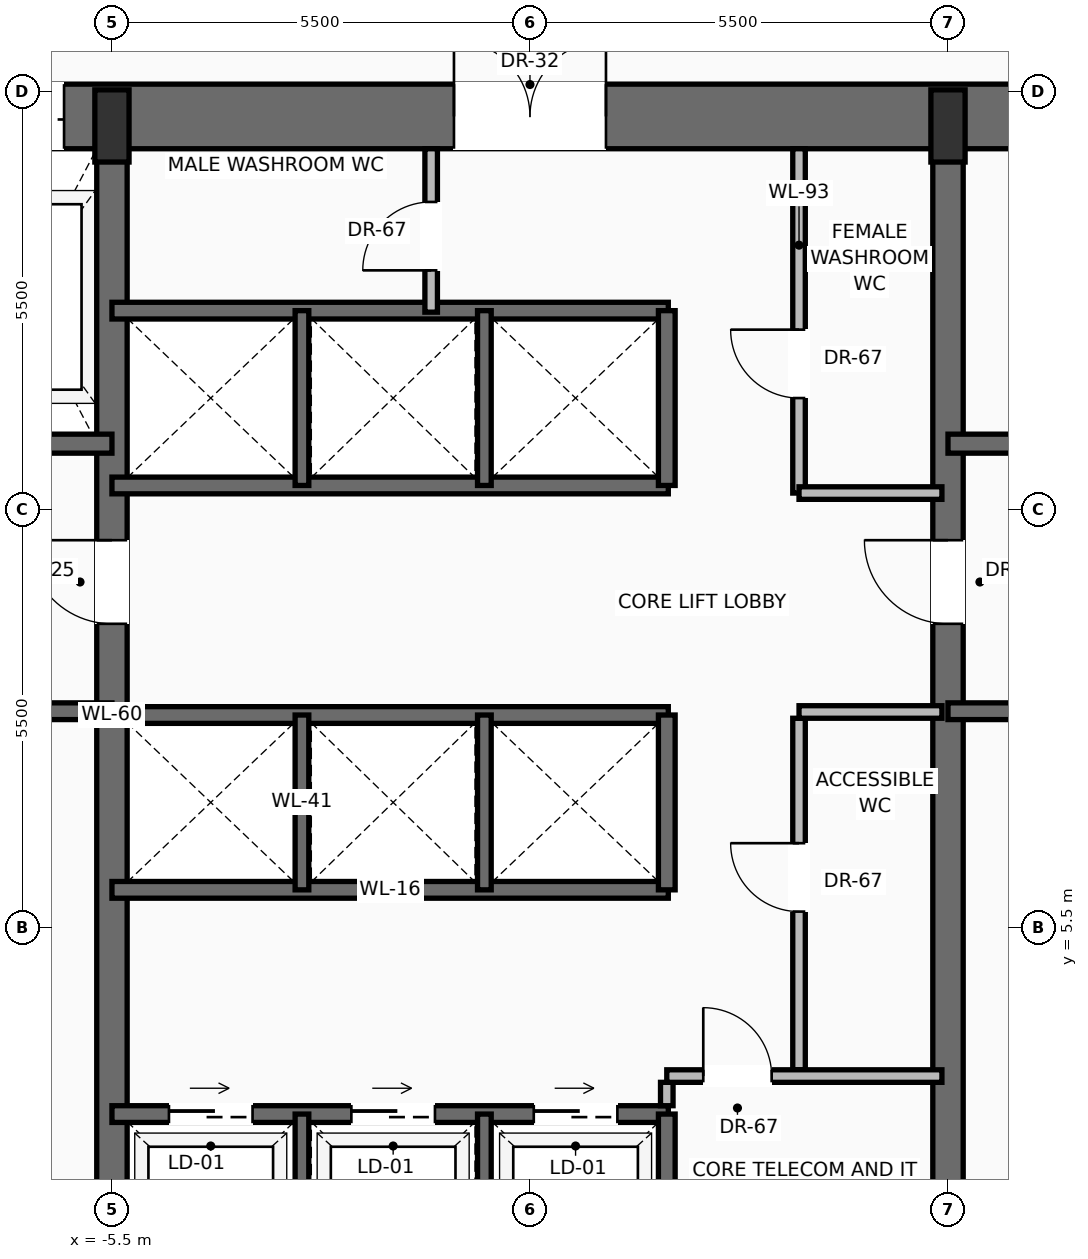
"""IFC4 building model, lengths in metres.
Left out: names, types, materials, properties, quantities, classifications, styles, units other than length and angle.
Written with IfcOpenShell. Run it as: python <this file> out.ifc"""

import sys

from ifc_helpers import new_model, si_unit, direction, frame, frame_2d, origin, origin_2d, place, context, subcontext, project, spatial, rectangle, extrude, source, transform, mapped, element, fill, save


model = new_model("IFC4")
c1 = context("Model", 3, precision=1e-05, world=origin(), true_north=direction((0.0, 1.0)))
c2 = subcontext(c1, "Body", "Model", "MODEL_VIEW")
j1 = project(units=[si_unit("LENGTHUNIT", "METRE"), si_unit("PLANEANGLEUNIT", "RADIAN")], contexts=[c1])
p1 = place(None, origin())
s1 = spatial("IfcSite", under=j1, at=p1, CompositionType="ELEMENT")
p2 = place(p1, origin())
s2 = spatial("IfcBuilding", under=s1, at=p2, CompositionType="ELEMENT")
p3 = place(p2, frame((0.0, 0.0, 31.2)))
s3 = spatial("IfcBuildingStorey", under=s2, at=p3, CompositionType="ELEMENT", Elevation=31.2)
p4 = place(p3, frame((-11.0, 16.175, 0.0), z_axis=(0.0, 0.0, 1.0), x_axis=(1.0, 0.0, 0.0)))
e1 = element("IfcWall", 1, at=p4, inside=s3, PredefinedType="SHEAR", context=c2, shape_type="SweptSolid", body=[
    extrude(rectangle(XDim=22.0, YDim=0.85, at=frame_2d((11.0, 0.0))), origin(), (0.0, 0.0, 1.0), 3.45),
])
p5 = place(p4, frame((3.57, 0.0, 0.0)))
e2 = element("IfcOpeningElement", 2, at=p5, cuts=e1, PredefinedType="OPENING", context=c2, shape_type="SweptSolid", body=[
    extrude(rectangle(XDim=1.3, YDim=2.3, at=frame_2d((0.65, 1.15))), frame((0.0, 0.435, 0.0), z_axis=(0.0, -1.0, 0.0), x_axis=(1.0, 0.0, 0.0)), (0.0, 0.0, 1.0), 0.87),
])
p6 = place(p4, frame((10.0, 0.0, 0.0)))
e3 = element("IfcOpeningElement", 3, at=p6, cuts=e1, PredefinedType="OPENING", context=c2, shape_type="SweptSolid", body=[
    extrude(rectangle(XDim=2.0, YDim=2.4, at=frame_2d((1.0, 1.2))), frame((0.0, 0.435, 0.0), z_axis=(0.0, -1.0, 0.0), x_axis=(1.0, 0.0, 0.0)), (0.0, 0.0, 1.0), 0.87),
])
p7 = place(p3, frame((-5.5, 0.425, 0.0), z_axis=(0.0, 0.0, 1.0), x_axis=(0.0, 1.0, 0.0)))
e4 = element("IfcWall", 4, at=p7, inside=s3, PredefinedType="SHEAR", context=c2, shape_type="SweptSolid", body=[
    extrude(rectangle(XDim=15.75, YDim=0.4, at=frame_2d((7.875, 0.0))), origin(), (0.0, 0.0, 1.0), 3.45),
])
p8 = place(p7, frame((9.075, 0.0, 0.0)))
e5 = element("IfcOpeningElement", 5, at=p8, cuts=e4, PredefinedType="OPENING", context=c2, shape_type="SweptSolid", body=[
    extrude(rectangle(XDim=1.1, YDim=2.2, at=frame_2d((0.55, 1.1))), frame((0.0, 0.21, 0.0), z_axis=(0.0, -1.0, 0.0), x_axis=(1.0, 0.0, 0.0)), (0.0, 0.0, 1.0), 0.42),
])
p9 = place(p3, frame((5.5, 0.425, 0.0), z_axis=(0.0, 0.0, 1.0), x_axis=(0.0, 1.0, 0.0)))
e6 = element("IfcWall", 6, at=p9, inside=s3, PredefinedType="SHEAR", context=c2, shape_type="SweptSolid", body=[
    extrude(rectangle(XDim=15.75, YDim=0.4, at=frame_2d((7.875, 0.0))), origin(), (0.0, 0.0, 1.0), 3.45),
])
p10 = place(p9, frame((9.075, 0.0, 0.0)))
e7 = element("IfcOpeningElement", 7, at=p10, cuts=e6, PredefinedType="OPENING", context=c2, shape_type="SweptSolid", body=[
    extrude(rectangle(XDim=1.1, YDim=2.2, at=frame_2d((0.55, 1.1))), frame((0.0, 0.21, 0.0), z_axis=(0.0, -1.0, 0.0), x_axis=(1.0, 0.0, 0.0)), (0.0, 0.0, 1.0), 0.42),
])
m1 = source(origin(), c2, "Body", "SweptSolid", [
    extrude(rectangle(XDim=0.45, YDim=0.95, at=origin_2d()), origin(), (0.0, 0.0, 1.0), 3.7),
])
for number, where, z_axis, x_axis in (
    (8, (-5.5, 16.05, 0.0), (0.0, 0.0, 1.0), (1.0, 0.0, 0.0)),
    (9, (5.5, 16.05, 0.0), (0.0, 0.0, 1.0), (1.0, 0.0, 0.0)),
):
    element("IfcColumn", number, at=place(p3, frame(where, z_axis=z_axis, x_axis=x_axis)), inside=s3, PredefinedType="PILASTER", context=c2, shape_type="MappedRepresentation", body=[
        mapped(m1, transform((0.0, 0.0, 0.0), scale=1.0)),
    ])
p11 = place(p3, frame((-5.5, 8.35, 0.0), z_axis=(0.0, 0.0, 1.0), x_axis=(-1.0, 0.0, 0.0)))
e10 = element("IfcWall", 10, at=p11, inside=s3, PredefinedType="SOLIDWALL", context=c2, shape_type="SweptSolid", body=[
    extrude(rectangle(XDim=4.65, YDim=0.22, at=frame_2d((2.325, 0.0))), origin(), (0.0, 0.0, 1.0), 3.45),
])
p12 = place(p11, frame((2.5, 0.0, 0.0)))
e11 = element("IfcOpeningElement", 11, at=p12, cuts=e10, PredefinedType="OPENING", context=c2, shape_type="SweptSolid", body=[
    extrude(rectangle(XDim=1.15, YDim=2.2, at=frame_2d((0.575, 1.1))), frame((0.0, 0.12, 0.0), z_axis=(0.0, -1.0, 0.0), x_axis=(1.0, 0.0, 0.0)), (0.0, 0.0, 1.0), 0.24),
])
p13 = place(p3, frame((-5.5, 11.87, 0.0), z_axis=(0.0, 0.0, 1.0), x_axis=(-1.0, 0.0, 0.0)))
e12 = element("IfcWall", 12, at=p13, inside=s3, PredefinedType="SOLIDWALL", context=c2, shape_type="SweptSolid", body=[
    extrude(rectangle(XDim=4.65, YDim=0.25, at=frame_2d((2.325, 0.0))), origin(), (0.0, 0.0, 1.0), 3.45),
])
p14 = place(p13, frame((2.95, 0.0, 0.0)))
e13 = element("IfcOpeningElement", 13, at=p14, cuts=e12, PredefinedType="OPENING", context=c2, shape_type="SweptSolid", body=[
    extrude(rectangle(XDim=1.2, YDim=2.25, at=frame_2d((0.6, 1.125))), frame((0.0, 0.135, 0.0), z_axis=(0.0, -1.0, 0.0), x_axis=(1.0, 0.0, 0.0)), (0.0, 0.0, 1.0), 0.27),
])
p15 = place(p3, frame((10.15, 8.35, 0.0), z_axis=(0.0, 0.0, 1.0), x_axis=(-1.0, 0.0, 0.0)))
e14 = element("IfcWall", 14, at=p15, inside=s3, PredefinedType="SOLIDWALL", context=c2, shape_type="SweptSolid", body=[
    extrude(rectangle(XDim=4.65, YDim=0.22, at=frame_2d((2.325, 0.0))), origin(), (0.0, 0.0, 1.0), 3.45),
])
p16 = place(p15, frame((1.0, 0.0, 0.0)))
e15 = element("IfcOpeningElement", 15, at=p16, cuts=e14, PredefinedType="OPENING", context=c2, shape_type="SweptSolid", body=[
    extrude(rectangle(XDim=1.15, YDim=2.2, at=frame_2d((0.575, 1.1))), frame((0.0, 0.12, 0.0), z_axis=(0.0, -1.0, 0.0), x_axis=(1.0, 0.0, 0.0)), (0.0, 0.0, 1.0), 0.24),
])
p17 = place(p3, frame((10.15, 11.87, 0.0), z_axis=(0.0, 0.0, 1.0), x_axis=(-1.0, 0.0, 0.0)))
e16 = element("IfcWall", 16, at=p17, inside=s3, PredefinedType="SOLIDWALL", context=c2, shape_type="SweptSolid", body=[
    extrude(rectangle(XDim=4.65, YDim=0.25, at=frame_2d((2.325, 0.0))), origin(), (0.0, 0.0, 1.0), 3.45),
])
p18 = place(p17, frame((0.5, 0.0, 0.0)))
e17 = element("IfcOpeningElement", 17, at=p18, cuts=e16, PredefinedType="OPENING", context=c2, shape_type="SweptSolid", body=[
    extrude(rectangle(XDim=1.2, YDim=2.25, at=frame_2d((0.6, 1.125))), frame((0.0, 0.135, 0.0), z_axis=(0.0, -1.0, 0.0), x_axis=(1.0, 0.0, 0.0)), (0.0, 0.0, 1.0), 0.27),
])
p19 = place(p3, frame((-5.5, 3.05, 0.0), z_axis=(0.0, 0.0, 1.0), x_axis=(1.0, 0.0, 0.0)))
e18 = element("IfcWall", 18, at=p19, inside=s3, PredefinedType="SOLIDWALL", context=c2, shape_type="SweptSolid", body=[
    extrude(rectangle(XDim=7.32, YDim=0.22, at=frame_2d((3.66, 0.0))), origin(), (0.0, 0.0, 1.0), 3.45),
])
p20 = place(p19, frame((0.75, 0.0, 0.0)))
e19 = element("IfcOpeningElement", 19, at=p20, cuts=e18, PredefinedType="OPENING", context=c2, shape_type="SweptSolid", body=[
    extrude(rectangle(XDim=1.1, YDim=2.2, at=frame_2d((0.55, 1.1))), frame((0.0, 0.12, 0.0), z_axis=(0.0, -1.0, 0.0), x_axis=(1.0, 0.0, 0.0)), (0.0, 0.0, 1.0), 0.24),
])
p21 = place(p19, frame((3.15, 0.0, 0.0)))
e20 = element("IfcOpeningElement", 20, at=p21, cuts=e18, PredefinedType="OPENING", context=c2, shape_type="SweptSolid", body=[
    extrude(rectangle(XDim=1.1, YDim=2.2, at=frame_2d((0.55, 1.1))), frame((0.0, 0.12, 0.0), z_axis=(0.0, -1.0, 0.0), x_axis=(1.0, 0.0, 0.0)), (0.0, 0.0, 1.0), 0.24),
])
p22 = place(p19, frame((5.55, 0.0, 0.0)))
e21 = element("IfcOpeningElement", 21, at=p22, cuts=e18, PredefinedType="OPENING", context=c2, shape_type="SweptSolid", body=[
    extrude(rectangle(XDim=1.1, YDim=2.2, at=frame_2d((0.55, 1.1))), frame((0.0, 0.12, 0.0), z_axis=(0.0, -1.0, 0.0), x_axis=(1.0, 0.0, 0.0)), (0.0, 0.0, 1.0), 0.24),
])
p23 = place(p3, frame((1.8, 0.85, 0.0), z_axis=(0.0, 0.0, 1.0), x_axis=(0.0, 1.0, 0.0)))
e22 = element("IfcWall", 22, at=p23, inside=s3, PredefinedType="SOLIDWALL", context=c2, shape_type="SweptSolid", body=[
    extrude(rectangle(XDim=2.2, YDim=0.22, at=frame_2d((1.1, 0.0))), origin(), (0.0, 0.0, 1.0), 3.45),
])
for number, where, z_axis, x_axis in (
    (23, (-3.0, 0.85, 0.0), (0.0, 0.0, 1.0), (0.0, 1.0, 0.0)),
    (24, (-0.6, 0.85, 0.0), (0.0, 0.0, 1.0), (0.0, 1.0, 0.0)),
):
    element("IfcWall", number, at=place(p3, frame(where, z_axis=z_axis, x_axis=x_axis)), inside=s3, PredefinedType="SOLIDWALL", context=c2, shape_type="SweptSolid", body=[
        extrude(rectangle(XDim=2.2, YDim=0.18, at=frame_2d((1.1, 0.0))), origin(), (0.0, 0.0, 1.0), 3.45),
    ])
p24 = place(p3, frame((1.8, 3.16, 0.0), z_axis=(0.0, 0.0, 1.0), x_axis=(0.0, 1.0, 0.0)))
e25 = element("IfcWall", 25, at=p24, inside=s3, PredefinedType="PARTITIONING", context=c2, shape_type="SweptSolid", body=[
    extrude(rectangle(XDim=0.308, YDim=0.165, at=frame_2d((0.154, 0.0))), origin(), (0.0, 0.0, 1.0), 3.442),
])
p25 = place(p3, frame((3.54, 3.633, 0.0), z_axis=(0.0, 0.0, 1.0), x_axis=(0.0, 1.0, 0.0)))
e26 = element("IfcWall", 26, at=p25, inside=s3, PredefinedType="PARTITIONING", context=c2, shape_type="SweptSolid", body=[
    extrude(rectangle(XDim=4.625, YDim=0.165, at=frame_2d((2.312, 0.0))), origin(), (0.0, 0.0, 1.0), 3.442),
])
p26 = place(p25, frame((2.081, 0.0, 0.0)))
e27 = element("IfcOpeningElement", 27, at=p26, cuts=e26, PredefinedType="OPENING", context=c2, shape_type="SweptSolid", body=[
    extrude(rectangle(XDim=0.9, YDim=2.1, at=frame_2d((0.45, 1.05))), frame((0.0, 0.093, 0.0), z_axis=(0.0, -1.0, 0.0), x_axis=(1.0, 0.0, 0.0)), (0.0, 0.0, 1.0), 0.185),
])
p27 = place(p3, frame((3.54, 8.34, 0.0), z_axis=(0.0, 0.0, 1.0), x_axis=(1.0, 0.0, 0.0)))
e28 = element("IfcWall", 28, at=p27, inside=s3, PredefinedType="PARTITIONING", context=c2, shape_type="SweptSolid", body=[
    extrude(rectangle(XDim=1.88, YDim=0.165, at=frame_2d((0.94, 0.0))), origin(), (0.0, 0.0, 1.0), 3.442),
])
p28 = place(p3, frame((1.8, 3.55, 0.0), z_axis=(0.0, 0.0, 1.0), x_axis=(1.0, 0.0, 0.0)))
e29 = element("IfcWall", 29, at=p28, inside=s3, PredefinedType="PARTITIONING", context=c2, shape_type="SweptSolid", body=[
    extrude(rectangle(XDim=3.62, YDim=0.165, at=frame_2d((1.81, 0.0))), origin(), (0.0, 0.0, 1.0), 3.442),
])
p29 = place(p28, frame((0.48, 0.0, 0.0)))
e30 = element("IfcOpeningElement", 30, at=p29, cuts=e29, PredefinedType="OPENING", context=c2, shape_type="SweptSolid", body=[
    extrude(rectangle(XDim=0.9, YDim=2.1, at=frame_2d((0.45, 1.05))), frame((0.0, 0.093, 0.0), z_axis=(0.0, -1.0, 0.0), x_axis=(1.0, 0.0, 0.0)), (0.0, 0.0, 1.0), 0.185),
])
for number, where, z_axis, x_axis in (
    (31, (-5.5, 6.0, 0.0), (0.0, 0.0, 1.0), (1.0, 0.0, 0.0)),
    (32, (-5.5, 8.3, 0.0), (0.0, 0.0, 1.0), (1.0, 0.0, 0.0)),
):
    element("IfcWall", number, at=place(p3, frame(where, z_axis=z_axis, x_axis=x_axis)), inside=s3, PredefinedType="SOLIDWALL", context=c2, shape_type="SweptSolid", body=[
        extrude(rectangle(XDim=7.32, YDim=0.22, at=frame_2d((3.66, 0.0))), origin(), (0.0, 0.0, 1.0), 3.45),
    ])
p30 = place(p3, frame((1.8, 6.0, 0.0), z_axis=(0.0, 0.0, 1.0), x_axis=(0.0, 1.0, 0.0)))
e33 = element("IfcWall", 33, at=p30, inside=s3, PredefinedType="SOLIDWALL", context=c2, shape_type="SweptSolid", body=[
    extrude(rectangle(XDim=2.3, YDim=0.22, at=frame_2d((1.15, 0.0))), origin(), (0.0, 0.0, 1.0), 3.45),
])
for number, where, z_axis, x_axis in (
    (34, (-3.0, 6.0, 0.0), (0.0, 0.0, 1.0), (0.0, 1.0, 0.0)),
    (35, (-0.6, 6.0, 0.0), (0.0, 0.0, 1.0), (0.0, 1.0, 0.0)),
):
    element("IfcWall", number, at=place(p3, frame(where, z_axis=z_axis, x_axis=x_axis)), inside=s3, PredefinedType="SOLIDWALL", context=c2, shape_type="SweptSolid", body=[
        extrude(rectangle(XDim=2.3, YDim=0.18, at=frame_2d((1.15, 0.0))), origin(), (0.0, 0.0, 1.0), 3.45),
    ])
for number, where, z_axis, x_axis in (
    (36, (-5.5, 11.32, 0.0), (0.0, 0.0, 1.0), (1.0, 0.0, 0.0)),
    (37, (-5.5, 13.62, 0.0), (0.0, 0.0, 1.0), (1.0, 0.0, 0.0)),
):
    element("IfcWall", number, at=place(p3, frame(where, z_axis=z_axis, x_axis=x_axis)), inside=s3, PredefinedType="SOLIDWALL", context=c2, shape_type="SweptSolid", body=[
        extrude(rectangle(XDim=7.32, YDim=0.22, at=frame_2d((3.66, 0.0))), origin(), (0.0, 0.0, 1.0), 3.45),
    ])
p31 = place(p3, frame((1.8, 11.32, 0.0), z_axis=(0.0, 0.0, 1.0), x_axis=(0.0, 1.0, 0.0)))
e38 = element("IfcWall", 38, at=p31, inside=s3, PredefinedType="SOLIDWALL", context=c2, shape_type="SweptSolid", body=[
    extrude(rectangle(XDim=2.3, YDim=0.22, at=frame_2d((1.15, 0.0))), origin(), (0.0, 0.0, 1.0), 3.45),
])
for number, where, z_axis, x_axis in (
    (39, (-3.0, 11.32, 0.0), (0.0, 0.0, 1.0), (0.0, 1.0, 0.0)),
    (40, (-0.6, 11.32, 0.0), (0.0, 0.0, 1.0), (0.0, 1.0, 0.0)),
):
    element("IfcWall", number, at=place(p3, frame(where, z_axis=z_axis, x_axis=x_axis)), inside=s3, PredefinedType="SOLIDWALL", context=c2, shape_type="SweptSolid", body=[
        extrude(rectangle(XDim=2.3, YDim=0.18, at=frame_2d((1.15, 0.0))), origin(), (0.0, 0.0, 1.0), 3.45),
    ])
p32 = place(p3, frame((-1.3, 13.6, 0.0), z_axis=(0.0, 0.0, 1.0), x_axis=(0.0, 1.0, 0.0)))
e41 = element("IfcWall", 41, at=p32, inside=s3, PredefinedType="PARTITIONING", context=c2, shape_type="SweptSolid", body=[
    extrude(rectangle(XDim=2.15, YDim=0.165, at=frame_2d((1.075, 0.0))), origin(), (0.0, 0.0, 1.0), 3.442),
])
p33 = place(p32, frame((0.55, 0.0, 0.0)))
e42 = element("IfcOpeningElement", 42, at=p33, cuts=e41, PredefinedType="OPENING", context=c2, shape_type="SweptSolid", body=[
    extrude(rectangle(XDim=0.9, YDim=2.1, at=frame_2d((0.45, 1.05))), frame((0.0, 0.093, 0.0), z_axis=(0.0, -1.0, 0.0), x_axis=(1.0, 0.0, 0.0)), (0.0, 0.0, 1.0), 0.185),
])
p34 = place(p3, frame((3.54, 11.22, 0.0), z_axis=(0.0, 0.0, 1.0), x_axis=(0.0, 1.0, 0.0)))
e43 = element("IfcWall", 43, at=p34, inside=s3, PredefinedType="PARTITIONING", context=c2, shape_type="SweptSolid", body=[
    extrude(rectangle(XDim=4.53, YDim=0.165, at=frame_2d((2.265, 0.0))), origin(), (0.0, 0.0, 1.0), 3.442),
])
p35 = place(p34, frame((1.25, 0.0, 0.0)))
e44 = element("IfcOpeningElement", 44, at=p35, cuts=e43, PredefinedType="OPENING", context=c2, shape_type="SweptSolid", body=[
    extrude(rectangle(XDim=0.9, YDim=2.1, at=frame_2d((0.45, 1.05))), frame((0.0, 0.093, 0.0), z_axis=(0.0, -1.0, 0.0), x_axis=(1.0, 0.0, 0.0)), (0.0, 0.0, 1.0), 0.185),
])
p36 = place(p3, frame((3.54, 11.22, 0.0), z_axis=(0.0, 0.0, 1.0), x_axis=(1.0, 0.0, 0.0)))
e45 = element("IfcWall", 45, at=p36, inside=s3, PredefinedType="PARTITIONING", context=c2, shape_type="SweptSolid", body=[
    extrude(rectangle(XDim=1.88, YDim=0.165, at=frame_2d((0.94, 0.0))), origin(), (0.0, 0.0, 1.0), 3.442),
])
m2 = source(origin(), c2, "Body", "SweptSolid", [
    extrude(rectangle(XDim=1.1, YDim=2.2, at=frame_2d((0.55, 1.1))), frame((0.0, 0.025, 0.0), z_axis=(0.0, -1.0, 0.0), x_axis=(1.0, 0.0, 0.0)), (0.0, 0.0, 1.0), 0.05),
])
p37 = place(p8, origin())
e46 = element("IfcDoor", 46, at=p37, inside=s3, OperationType="SINGLE_SWING_RIGHT", PredefinedType="DOOR", context=c2, shape_type="MappedRepresentation", body=[
    mapped(m2, transform((0.0, 0.0, 0.0), scale=1.0)),
])
fill(e5, e46)
m3 = source(origin(), c2, "Body", "SweptSolid", [
    extrude(rectangle(XDim=1.3, YDim=2.3, at=frame_2d((0.65, 1.15))), frame((0.0, 0.025, 0.0), z_axis=(0.0, -1.0, 0.0), x_axis=(1.0, 0.0, 0.0)), (0.0, 0.0, 1.0), 0.05),
])
p38 = place(p5, origin())
e47 = element("IfcDoor", 47, at=p38, inside=s3, OperationType="SLIDING_TO_RIGHT", PredefinedType="DOOR", context=c2, shape_type="MappedRepresentation", body=[
    mapped(m3, transform((0.0, 0.0, 0.0), scale=1.0)),
])
fill(e2, e47)
p39 = place(p10, origin())
e48 = element("IfcDoor", 48, at=p39, inside=s3, OperationType="SINGLE_SWING_RIGHT", PredefinedType="DOOR", context=c2, shape_type="MappedRepresentation", body=[
    mapped(m2, transform((0.0, 0.0, 0.0), scale=1.0)),
])
fill(e7, e48)
m4 = source(origin(), c2, "Body", "SweptSolid", [
    extrude(rectangle(XDim=2.0, YDim=2.4, at=frame_2d((1.0, 1.2))), frame((0.0, 0.025, 0.0), z_axis=(0.0, -1.0, 0.0), x_axis=(1.0, 0.0, 0.0)), (0.0, 0.0, 1.0), 0.05),
])
p40 = place(p6, origin())
e49 = element("IfcDoor", 49, at=p40, inside=s3, OperationType="DOUBLE_DOOR_SINGLE_SWING", PredefinedType="DOOR", context=c2, shape_type="MappedRepresentation", body=[
    mapped(m4, transform((0.0, 0.0, 0.0), scale=1.0)),
])
fill(e3, e49)
m5 = source(origin(), c2, "Body", "SweptSolid", [
    extrude(rectangle(XDim=1.1, YDim=2.2, at=frame_2d((0.55, 1.1))), frame((0.0, 0.025, 0.0), z_axis=(0.0, -1.0, 0.0), x_axis=(1.0, 0.0, 0.0)), (0.0, 0.0, 1.0), 0.05),
])
p41 = place(p20, origin())
e50 = element("IfcDoor", 50, at=p41, inside=s3, OperationType="SLIDING_TO_RIGHT", PredefinedType="DOOR", context=c2, shape_type="MappedRepresentation", body=[
    mapped(m5, transform((0.0, 0.0, 0.0), scale=1.0)),
])
fill(e19, e50)
p42 = place(p21, origin())
e51 = element("IfcDoor", 51, at=p42, inside=s3, OperationType="SLIDING_TO_RIGHT", PredefinedType="DOOR", context=c2, shape_type="MappedRepresentation", body=[
    mapped(m5, transform((0.0, 0.0, 0.0), scale=1.0)),
])
fill(e20, e51)
p43 = place(p22, origin())
e52 = element("IfcDoor", 52, at=p43, inside=s3, OperationType="SLIDING_TO_RIGHT", PredefinedType="DOOR", context=c2, shape_type="MappedRepresentation", body=[
    mapped(m5, transform((0.0, 0.0, 0.0), scale=1.0)),
])
fill(e21, e52)
m6 = source(origin(), c2, "Body", "SweptSolid", [
    extrude(rectangle(XDim=0.9, YDim=2.1, at=frame_2d((0.45, 1.05))), frame((0.0, 0.025, 0.0), z_axis=(0.0, -1.0, 0.0), x_axis=(1.0, 0.0, 0.0)), (0.0, 0.0, 1.0), 0.05),
])
p44 = place(p29, origin())
e53 = element("IfcDoor", 53, at=p44, inside=s3, OperationType="SINGLE_SWING_LEFT", PredefinedType="DOOR", context=c2, shape_type="MappedRepresentation", body=[
    mapped(m6, transform((0.0, 0.0, 0.0), scale=1.0)),
])
fill(e30, e53)
p45 = place(p26, origin())
e54 = element("IfcDoor", 54, at=p45, inside=s3, OperationType="SINGLE_SWING_RIGHT", PredefinedType="DOOR", context=c2, shape_type="MappedRepresentation", body=[
    mapped(m6, transform((0.0, 0.0, 0.0), scale=1.0)),
])
fill(e27, e54)
p46 = place(p33, origin())
e55 = element("IfcDoor", 55, at=p46, inside=s3, OperationType="SINGLE_SWING_LEFT", PredefinedType="DOOR", context=c2, shape_type="MappedRepresentation", body=[
    mapped(m6, transform((0.0, 0.0, 0.0), scale=1.0)),
])
fill(e42, e55)
p47 = place(p35, origin())
e56 = element("IfcDoor", 56, at=p47, inside=s3, OperationType="SINGLE_SWING_RIGHT", PredefinedType="DOOR", context=c2, shape_type="MappedRepresentation", body=[
    mapped(m6, transform((0.0, 0.0, 0.0), scale=1.0)),
])
fill(e44, e56)
save(model, sys.argv[1])
